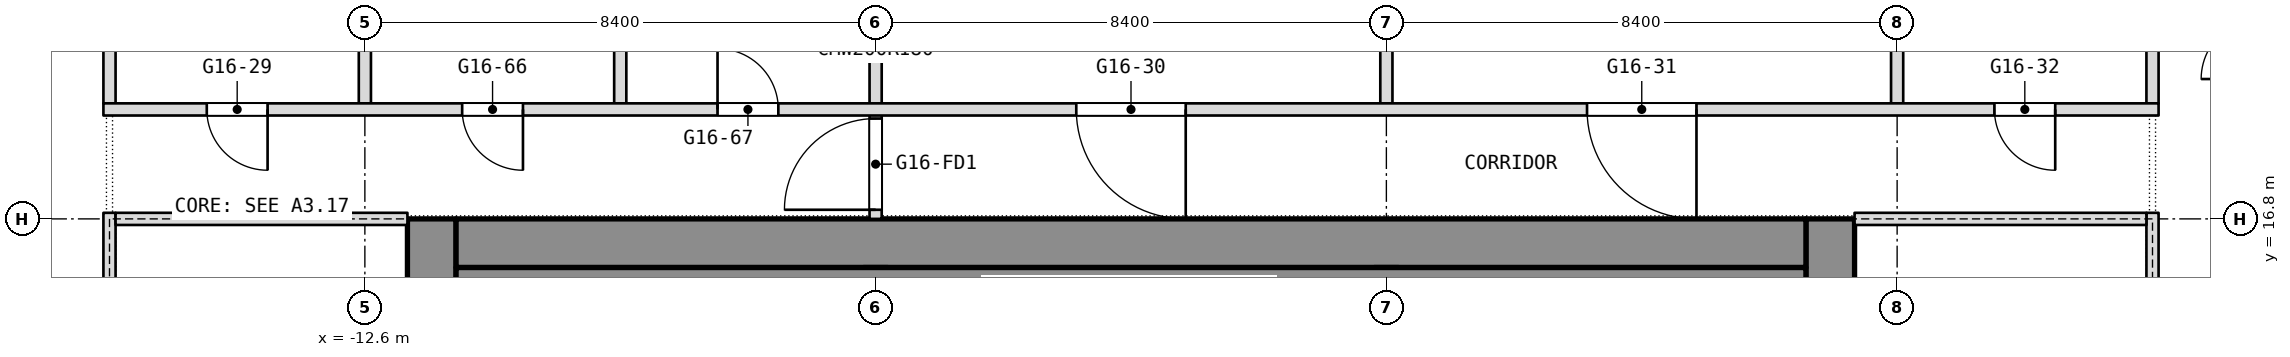
"""IFC4 building model, lengths in metres.
Left out: names, types, materials, properties, quantities, classifications, styles, units other than length and angle.
Written with IfcOpenShell. Run it as: python <this file> out.ifc"""

import sys

from ifc_helpers import new_model, si_unit, direction, frame, frame_2d, origin, place, context, subcontext, project, spatial, rectangle, extrude, element, fill, save


model = new_model("IFC4")
c1 = context("Model", 3, precision=1e-05, world=origin(), true_north=direction((0.0, 1.0)))
c2 = subcontext(c1, "Body", "Model", "MODEL_VIEW")
j1 = project(units=[si_unit("LENGTHUNIT", "METRE"), si_unit("PLANEANGLEUNIT", "RADIAN")], contexts=[c1])
p1 = place(None, origin())
s1 = spatial("IfcSite", under=j1, at=p1, CompositionType="ELEMENT")
p2 = place(p1, origin())
s2 = spatial("IfcBuilding", under=s1, at=p2, CompositionType="ELEMENT")
p3 = place(p2, frame((0.0, 0.0, 205.7)))
s3 = spatial("IfcBuildingStorey", under=s2, at=p3, CompositionType="ELEMENT", Elevation=205.7)
p4 = place(p3, frame((11.5, 0.0, 0.0), z_axis=(0.0, 0.0, 1.0), x_axis=(0.0, 1.0, 0.0)))
e1 = element("IfcWall", 1, at=p4, inside=s3, PredefinedType="SHEAR", context=c2, shape_type="SweptSolid", body=[
    extrude(rectangle(XDim=16.8, YDim=0.8, at=frame_2d((8.4, 0.0))), origin(), (0.0, 0.0, 1.0), 3.6),
])
p5 = place(p4, frame((2.3, 0.0, 0.0)))
e2 = element("IfcOpeningElement", 2, at=p5, cuts=e1, PredefinedType="OPENING", context=c2, shape_type="SweptSolid", body=[
    extrude(rectangle(XDim=1.1, YDim=2.1, at=frame_2d((0.55, 1.05))), frame((0.0, 0.4, 0.0), z_axis=(0.0, -1.0, 0.0), x_axis=(1.0, 0.0, 0.0)), (0.0, 0.0, 1.0), 0.8),
])
p6 = place(p4, frame((4.85, 0.0, 0.0)))
e3 = element("IfcOpeningElement", 3, at=p6, cuts=e1, PredefinedType="OPENING", context=c2, shape_type="SweptSolid", body=[
    extrude(rectangle(XDim=1.1, YDim=2.1, at=frame_2d((0.55, 1.05))), frame((0.0, 0.4, 0.0), z_axis=(0.0, -1.0, 0.0), x_axis=(1.0, 0.0, 0.0)), (0.0, 0.0, 1.0), 0.8),
])
p7 = place(p4, frame((6.825, 0.0, 0.0)))
e4 = element("IfcOpeningElement", 4, at=p7, cuts=e1, PredefinedType="OPENING", context=c2, shape_type="SweptSolid", body=[
    extrude(rectangle(XDim=1.2, YDim=2.1, at=frame_2d((0.6, 1.05))), frame((0.0, 0.4, 0.0), z_axis=(0.0, -1.0, 0.0), x_axis=(1.0, 0.0, 0.0)), (0.0, 0.0, 1.0), 0.8),
])
p8 = place(p4, frame((13.4, 0.0, 0.0)))
e5 = element("IfcOpeningElement", 5, at=p8, cuts=e1, PredefinedType="OPENING", context=c2, shape_type="SweptSolid", body=[
    extrude(rectangle(XDim=1.1, YDim=2.1, at=frame_2d((0.55, 1.05))), frame((0.0, 0.4, 0.0), z_axis=(0.0, -1.0, 0.0), x_axis=(1.0, 0.0, 0.0)), (0.0, 0.0, 1.0), 0.8),
])
p9 = place(p4, frame((10.85, 0.0, 0.0)))
e6 = element("IfcOpeningElement", 6, at=p9, cuts=e1, PredefinedType="OPENING", context=c2, shape_type="SweptSolid", body=[
    extrude(rectangle(XDim=1.1, YDim=2.1, at=frame_2d((0.55, 1.05))), frame((0.0, 0.4, 0.0), z_axis=(0.0, -1.0, 0.0), x_axis=(1.0, 0.0, 0.0)), (0.0, 0.0, 1.0), 0.8),
])
p10 = place(p4, frame((8.775, 0.0, 0.0)))
e7 = element("IfcOpeningElement", 7, at=p10, cuts=e1, PredefinedType="OPENING", context=c2, shape_type="SweptSolid", body=[
    extrude(rectangle(XDim=1.2, YDim=2.1, at=frame_2d((0.6, 1.05))), frame((0.0, 0.4, 0.0), z_axis=(0.0, -1.0, 0.0), x_axis=(1.0, 0.0, 0.0)), (0.0, 0.0, 1.0), 0.8),
])
p11 = place(p3, frame((-11.5, 0.0, 0.0), z_axis=(0.0, 0.0, 1.0), x_axis=(0.0, 1.0, 0.0)))
e8 = element("IfcWall", 8, at=p11, inside=s3, PredefinedType="SHEAR", context=c2, shape_type="SweptSolid", body=[
    extrude(rectangle(XDim=16.8, YDim=0.8, at=frame_2d((8.4, 0.0))), origin(), (0.0, 0.0, 1.0), 3.6),
])
p12 = place(p11, frame((3.6, 0.0, 0.0)))
e9 = element("IfcOpeningElement", 9, at=p12, cuts=e8, PredefinedType="OPENING", context=c2, shape_type="SweptSolid", body=[
    extrude(rectangle(XDim=0.9, YDim=2.1, at=frame_2d((0.45, 1.05))), frame((0.0, 0.4, 0.0), z_axis=(0.0, -1.0, 0.0), x_axis=(1.0, 0.0, 0.0)), (0.0, 0.0, 1.0), 0.8),
])
p13 = place(p11, frame((6.825, 0.0, 0.0)))
e10 = element("IfcOpeningElement", 10, at=p13, cuts=e8, PredefinedType="OPENING", context=c2, shape_type="SweptSolid", body=[
    extrude(rectangle(XDim=1.2, YDim=2.1, at=frame_2d((0.6, 1.05))), frame((0.0, 0.4, 0.0), z_axis=(0.0, -1.0, 0.0), x_axis=(1.0, 0.0, 0.0)), (0.0, 0.0, 1.0), 0.8),
])
p14 = place(p11, frame((14.062, 0.0, 0.0)))
e11 = element("IfcOpeningElement", 11, at=p14, cuts=e8, PredefinedType="OPENING", context=c2, shape_type="SweptSolid", body=[
    extrude(rectangle(XDim=0.9, YDim=2.1, at=frame_2d((0.45, 1.05))), frame((0.0, 0.4, 0.0), z_axis=(0.0, -1.0, 0.0), x_axis=(1.0, 0.0, 0.0)), (0.0, 0.0, 1.0), 0.8),
])
p15 = place(p11, frame((11.438, 0.0, 0.0)))
e12 = element("IfcOpeningElement", 12, at=p15, cuts=e8, PredefinedType="OPENING", context=c2, shape_type="SweptSolid", body=[
    extrude(rectangle(XDim=0.9, YDim=2.1, at=frame_2d((0.45, 1.05))), frame((0.0, 0.4, 0.0), z_axis=(0.0, -1.0, 0.0), x_axis=(1.0, 0.0, 0.0)), (0.0, 0.0, 1.0), 0.8),
])
p16 = place(p11, frame((8.775, 0.0, 0.0)))
e13 = element("IfcOpeningElement", 13, at=p16, cuts=e8, PredefinedType="OPENING", context=c2, shape_type="SweptSolid", body=[
    extrude(rectangle(XDim=1.2, YDim=2.1, at=frame_2d((0.6, 1.05))), frame((0.0, 0.4, 0.0), z_axis=(0.0, -1.0, 0.0), x_axis=(1.0, 0.0, 0.0)), (0.0, 0.0, 1.0), 0.8),
])
p17 = place(p3, frame((-11.1, 16.4, 0.0), z_axis=(0.0, 0.0, 1.0), x_axis=(1.0, 0.0, 0.0)))
e14 = element("IfcWall", 14, at=p17, inside=s3, PredefinedType="SHEAR", context=c2, shape_type="SweptSolid", body=[
    extrude(rectangle(XDim=22.2, YDim=0.8, at=frame_2d((11.1, 0.0))), origin(), (0.0, 0.0, 1.0), 3.6),
])
p18 = place(p3, frame((-4.2, 0.8, 0.0), z_axis=(0.0, 0.0, 1.0), x_axis=(0.0, 1.0, 0.0)))
e15 = element("IfcWall", 15, at=p18, inside=s3, PredefinedType="SHEAR", context=c2, shape_type="SweptSolid", body=[
    extrude(rectangle(XDim=15.2, YDim=0.4, at=frame_2d((7.6, 0.0))), origin(), (0.0, 0.0, 1.0), 3.6),
])
p19 = place(p18, frame((8.5, 0.0, 0.0)))
e16 = element("IfcOpeningElement", 16, at=p19, cuts=e15, PredefinedType="OPENING", context=c2, shape_type="SweptSolid", body=[
    extrude(rectangle(XDim=1.2, YDim=2.1, at=frame_2d((0.6, 1.05))), frame((0.0, 0.2, 0.0), z_axis=(0.0, -1.0, 0.0), x_axis=(1.0, 0.0, 0.0)), (0.0, 0.0, 1.0), 0.4),
])
p20 = place(p3, frame((4.2, 0.8, 0.0), z_axis=(0.0, 0.0, 1.0), x_axis=(0.0, 1.0, 0.0)))
e17 = element("IfcWall", 17, at=p20, inside=s3, PredefinedType="SHEAR", context=c2, shape_type="SweptSolid", body=[
    extrude(rectangle(XDim=15.2, YDim=0.4, at=frame_2d((7.6, 0.0))), origin(), (0.0, 0.0, 1.0), 3.6),
])
p21 = place(p20, frame((5.95, 0.0, 0.0)))
e18 = element("IfcOpeningElement", 18, at=p21, cuts=e17, PredefinedType="OPENING", context=c2, shape_type="SweptSolid", body=[
    extrude(rectangle(XDim=1.2, YDim=2.1, at=frame_2d((0.6, 1.05))), frame((0.0, 0.2, 0.0), z_axis=(0.0, -1.0, 0.0), x_axis=(1.0, 0.0, 0.0)), (0.0, 0.0, 1.0), 0.4),
])
for number, where, z_axis, x_axis in (
    (19, (16.8, 18.7, 0.0), (0.0, 0.0, 1.0), (0.0, 1.0, 0.0)),
    (20, (12.6, 18.7, 0.0), (0.0, 0.0, 1.0), (0.0, 1.0, 0.0)),
    (21, (4.2, 18.7, 0.0), (0.0, 0.0, 1.0), (0.0, 1.0, 0.0)),
):
    element("IfcWall", number, at=place(p3, frame(where, z_axis=z_axis, x_axis=x_axis)), inside=s3, PredefinedType="PARTITIONING", context=c2, shape_type="SweptSolid", body=[
        extrude(rectangle(XDim=3.64, YDim=0.2, at=frame_2d((1.82, 0.0))), origin(), (0.0, 0.0, 1.0), 3.34),
    ])
p22 = place(p3, frame((-4.2, 16.8, 0.0), z_axis=(0.0, 0.0, 1.0), x_axis=(0.0, 1.0, 0.0)))
e22 = element("IfcWall", 22, at=p22, inside=s3, PredefinedType="PARTITIONING", context=c2, shape_type="SweptSolid", body=[
    extrude(rectangle(XDim=5.54, YDim=0.2, at=frame_2d((2.77, 0.0))), origin(), (0.0, 0.0, 1.0), 3.34),
])
p23 = place(p22, frame((0.15, 0.0, 0.0)))
e23 = element("IfcOpeningElement", 23, at=p23, cuts=e22, PredefinedType="OPENING", context=c2, shape_type="SweptSolid", body=[
    extrude(rectangle(XDim=1.5, YDim=2.1, at=frame_2d((0.75, 1.05))), frame((0.0, 0.1, 0.0), z_axis=(0.0, -1.0, 0.0), x_axis=(1.0, 0.0, 0.0)), (0.0, 0.0, 1.0), 0.2),
])
for number, where, z_axis, x_axis in (
    (24, (-8.4, 18.7, 0.0), (0.0, 0.0, 1.0), (0.0, 1.0, 0.0)),
    (25, (-12.6, 18.7, 0.0), (0.0, 0.0, 1.0), (0.0, 1.0, 0.0)),
    (26, (-16.8, 18.7, 0.0), (0.0, 0.0, 1.0), (0.0, 1.0, 0.0)),
):
    element("IfcWall", number, at=place(p3, frame(where, z_axis=z_axis, x_axis=x_axis)), inside=s3, PredefinedType="PARTITIONING", context=c2, shape_type="SweptSolid", body=[
        extrude(rectangle(XDim=3.64, YDim=0.2, at=frame_2d((1.82, 0.0))), origin(), (0.0, 0.0, 1.0), 3.34),
    ])
p24 = place(p3, frame((-16.9, 18.6, 0.0), z_axis=(0.0, 0.0, 1.0), x_axis=(1.0, 0.0, 0.0)))
e27 = element("IfcWall", 27, at=p24, inside=s3, PredefinedType="PARTITIONING", context=c2, shape_type="SweptSolid", body=[
    extrude(rectangle(XDim=33.8, YDim=0.2, at=frame_2d((16.9, 0.0))), origin(), (0.0, 0.0, 1.0), 3.34),
])
p25 = place(p24, frame((1.7, 0.0, 0.0)))
e28 = element("IfcOpeningElement", 28, at=p25, cuts=e27, PredefinedType="OPENING", context=c2, shape_type="SweptSolid", body=[
    extrude(rectangle(XDim=1.0, YDim=2.1, at=frame_2d((0.5, 1.05))), frame((0.0, 0.1, 0.0), z_axis=(0.0, -1.0, 0.0), x_axis=(1.0, 0.0, 0.0)), (0.0, 0.0, 1.0), 0.2),
])
p26 = place(p24, frame((16.0, 0.0, 0.0)))
e29 = element("IfcOpeningElement", 29, at=p26, cuts=e27, PredefinedType="OPENING", context=c2, shape_type="SweptSolid", body=[
    extrude(rectangle(XDim=1.8, YDim=2.1, at=frame_2d((0.9, 1.05))), frame((0.0, 0.1, 0.0), z_axis=(0.0, -1.0, 0.0), x_axis=(1.0, 0.0, 0.0)), (0.0, 0.0, 1.0), 0.2),
])
p27 = place(p24, frame((24.4, 0.0, 0.0)))
e30 = element("IfcOpeningElement", 30, at=p27, cuts=e27, PredefinedType="OPENING", context=c2, shape_type="SweptSolid", body=[
    extrude(rectangle(XDim=1.8, YDim=2.1, at=frame_2d((0.9, 1.05))), frame((0.0, 0.1, 0.0), z_axis=(0.0, -1.0, 0.0), x_axis=(1.0, 0.0, 0.0)), (0.0, 0.0, 1.0), 0.2),
])
p28 = place(p24, frame((31.1, 0.0, 0.0)))
e31 = element("IfcOpeningElement", 31, at=p28, cuts=e27, PredefinedType="OPENING", context=c2, shape_type="SweptSolid", body=[
    extrude(rectangle(XDim=1.0, YDim=2.1, at=frame_2d((0.5, 1.05))), frame((0.0, 0.1, 0.0), z_axis=(0.0, -1.0, 0.0), x_axis=(1.0, 0.0, 0.0)), (0.0, 0.0, 1.0), 0.2),
])
p29 = place(p24, frame((5.9, 0.0, 0.0)))
e32 = element("IfcOpeningElement", 32, at=p29, cuts=e27, PredefinedType="OPENING", context=c2, shape_type="SweptSolid", body=[
    extrude(rectangle(XDim=1.0, YDim=2.1, at=frame_2d((0.5, 1.05))), frame((0.0, 0.1, 0.0), z_axis=(0.0, -1.0, 0.0), x_axis=(1.0, 0.0, 0.0)), (0.0, 0.0, 1.0), 0.2),
])
p30 = place(p24, frame((10.1, 0.0, 0.0)))
e33 = element("IfcOpeningElement", 33, at=p30, cuts=e27, PredefinedType="OPENING", context=c2, shape_type="SweptSolid", body=[
    extrude(rectangle(XDim=1.0, YDim=2.1, at=frame_2d((0.5, 1.05))), frame((0.0, 0.1, 0.0), z_axis=(0.0, -1.0, 0.0), x_axis=(1.0, 0.0, 0.0)), (0.0, 0.0, 1.0), 0.2),
])
p31 = place(p3, frame((-11.1, 15.65, 0.0), z_axis=(0.0, 0.0, 1.0), x_axis=(1.0, 0.0, 0.0)))
e34 = element("IfcWall", 34, at=p31, inside=s3, PredefinedType="PARTITIONING", context=c2, shape_type="SweptSolid", body=[
    extrude(rectangle(XDim=22.2, YDim=0.7, at=frame_2d((11.1, 0.0))), origin(), (0.0, 0.0, 1.0), 3.34),
])
p32 = place(p3, frame((-16.8, -0.1, 0.0), z_axis=(0.0, 0.0, 1.0), x_axis=(0.0, 1.0, 0.0)))
e35 = element("IfcWall", 35, at=p32, inside=s3, PredefinedType="PARTITIONING", context=c2, shape_type="SweptSolid", body=[
    extrude(rectangle(XDim=17.0, YDim=0.2, at=frame_2d((8.5, 0.0))), origin(), (0.0, 0.0, 1.0), 3.34),
])
p33 = place(p32, frame((2.2, 0.0, 0.0)))
e36 = element("IfcOpeningElement", 36, at=p33, cuts=e35, PredefinedType="OPENING", context=c2, shape_type="SweptSolid", body=[
    extrude(rectangle(XDim=1.8, YDim=2.1, at=frame_2d((0.9, 1.05))), frame((0.0, 0.1, 0.0), z_axis=(0.0, -1.0, 0.0), x_axis=(1.0, 0.0, 0.0)), (0.0, 0.0, 1.0), 0.2),
])
p34 = place(p32, frame((13.0, 0.0, 0.0)))
e37 = element("IfcOpeningElement", 37, at=p34, cuts=e35, PredefinedType="OPENING", context=c2, shape_type="SweptSolid", body=[
    extrude(rectangle(XDim=1.8, YDim=2.1, at=frame_2d((0.9, 1.05))), frame((0.0, 0.1, 0.0), z_axis=(0.0, -1.0, 0.0), x_axis=(1.0, 0.0, 0.0)), (0.0, 0.0, 1.0), 0.2),
])
p35 = place(p3, frame((-16.7, 16.8, 0.0), z_axis=(0.0, 0.0, 1.0), x_axis=(1.0, 0.0, 0.0)))
e38 = element("IfcWall", 38, at=p35, inside=s3, PredefinedType="PARTITIONING", context=c2, shape_type="SweptSolid", body=[
    extrude(rectangle(XDim=4.8, YDim=0.2, at=frame_2d((2.4, 0.0))), origin(), (0.0, 0.0, 1.0), 2.94),
])
p36 = place(p3, frame((16.8, -0.1, 0.0), z_axis=(0.0, 0.0, 1.0), x_axis=(0.0, 1.0, 0.0)))
e39 = element("IfcWall", 39, at=p36, inside=s3, PredefinedType="PARTITIONING", context=c2, shape_type="SweptSolid", body=[
    extrude(rectangle(XDim=17.0, YDim=0.2, at=frame_2d((8.5, 0.0))), origin(), (0.0, 0.0, 1.0), 3.34),
])
p37 = place(p36, frame((2.2, 0.0, 0.0)))
e40 = element("IfcOpeningElement", 40, at=p37, cuts=e39, PredefinedType="OPENING", context=c2, shape_type="SweptSolid", body=[
    extrude(rectangle(XDim=1.8, YDim=2.1, at=frame_2d((0.9, 1.05))), frame((0.0, 0.1, 0.0), z_axis=(0.0, -1.0, 0.0), x_axis=(1.0, 0.0, 0.0)), (0.0, 0.0, 1.0), 0.2),
])
p38 = place(p36, frame((13.0, 0.0, 0.0)))
e41 = element("IfcOpeningElement", 41, at=p38, cuts=e39, PredefinedType="OPENING", context=c2, shape_type="SweptSolid", body=[
    extrude(rectangle(XDim=1.8, YDim=2.1, at=frame_2d((0.9, 1.05))), frame((0.0, 0.1, 0.0), z_axis=(0.0, -1.0, 0.0), x_axis=(1.0, 0.0, 0.0)), (0.0, 0.0, 1.0), 0.2),
])
p39 = place(p3, frame((11.9, 16.8, 0.0), z_axis=(0.0, 0.0, 1.0), x_axis=(1.0, 0.0, 0.0)))
e42 = element("IfcWall", 42, at=p39, inside=s3, PredefinedType="PARTITIONING", context=c2, shape_type="SweptSolid", body=[
    extrude(rectangle(XDim=4.8, YDim=0.2, at=frame_2d((2.4, 0.0))), origin(), (0.0, 0.0, 1.0), 2.94),
])
p40 = place(p25, origin())
e43 = element("IfcDoor", 43, at=p40, inside=s3, OperationType="SINGLE_SWING_LEFT", PredefinedType="DOOR", context=c2, shape_type="SweptSolid", body=[
    extrude(rectangle(XDim=1.0, YDim=2.1, at=frame_2d((0.5, 1.05))), frame((0.0, 0.025, 0.0), z_axis=(0.0, -1.0, 0.0), x_axis=(1.0, 0.0, 0.0)), (0.0, 0.0, 1.0), 0.05),
])
fill(e28, e43)
p41 = place(p26, origin())
e44 = element("IfcDoor", 44, at=p41, inside=s3, OperationType="DOUBLE_DOOR_SINGLE_SWING", PredefinedType="DOOR", context=c2, shape_type="SweptSolid", body=[
    extrude(rectangle(XDim=1.8, YDim=2.1, at=frame_2d((0.9, 1.05))), frame((0.0, 0.025, 0.0), z_axis=(0.0, -1.0, 0.0), x_axis=(1.0, 0.0, 0.0)), (0.0, 0.0, 1.0), 0.05),
])
fill(e29, e44)
p42 = place(p27, origin())
e45 = element("IfcDoor", 45, at=p42, inside=s3, OperationType="DOUBLE_DOOR_SINGLE_SWING", PredefinedType="DOOR", context=c2, shape_type="SweptSolid", body=[
    extrude(rectangle(XDim=1.8, YDim=2.1, at=frame_2d((0.9, 1.05))), frame((0.0, 0.025, 0.0), z_axis=(0.0, -1.0, 0.0), x_axis=(1.0, 0.0, 0.0)), (0.0, 0.0, 1.0), 0.05),
])
fill(e30, e45)
p43 = place(p28, origin())
e46 = element("IfcDoor", 46, at=p43, inside=s3, OperationType="SINGLE_SWING_RIGHT", PredefinedType="DOOR", context=c2, shape_type="SweptSolid", body=[
    extrude(rectangle(XDim=1.0, YDim=2.1, at=frame_2d((0.5, 1.05))), frame((0.0, 0.025, 0.0), z_axis=(0.0, -1.0, 0.0), x_axis=(1.0, 0.0, 0.0)), (0.0, 0.0, 1.0), 0.05),
])
fill(e31, e46)
p44 = place(p29, origin())
e47 = element("IfcDoor", 47, at=p44, inside=s3, OperationType="SINGLE_SWING_RIGHT", PredefinedType="DOOR", context=c2, shape_type="SweptSolid", body=[
    extrude(rectangle(XDim=1.0, YDim=2.1, at=frame_2d((0.5, 1.05))), frame((0.0, 0.025, 0.0), z_axis=(0.0, -1.0, 0.0), x_axis=(1.0, 0.0, 0.0)), (0.0, 0.0, 1.0), 0.05),
])
fill(e32, e47)
p45 = place(p30, origin())
e48 = element("IfcDoor", 48, at=p45, inside=s3, OperationType="SINGLE_SWING_LEFT", PredefinedType="DOOR", context=c2, shape_type="SweptSolid", body=[
    extrude(rectangle(XDim=1.0, YDim=2.1, at=frame_2d((0.5, 1.05))), frame((0.0, 0.025, 0.0), z_axis=(0.0, -1.0, 0.0), x_axis=(1.0, 0.0, 0.0)), (0.0, 0.0, 1.0), 0.05),
])
fill(e33, e48)
p46 = place(p23, origin())
e49 = element("IfcDoor", 49, at=p46, inside=s3, OperationType="DOUBLE_DOOR_DOUBLE_SWING", PredefinedType="DOOR", context=c2, shape_type="SweptSolid", body=[
    extrude(rectangle(XDim=1.5, YDim=2.1, at=frame_2d((0.75, 1.05))), frame((0.0, 0.025, 0.0), z_axis=(0.0, -1.0, 0.0), x_axis=(1.0, 0.0, 0.0)), (0.0, 0.0, 1.0), 0.05),
])
fill(e23, e49)
save(model, sys.argv[1])
